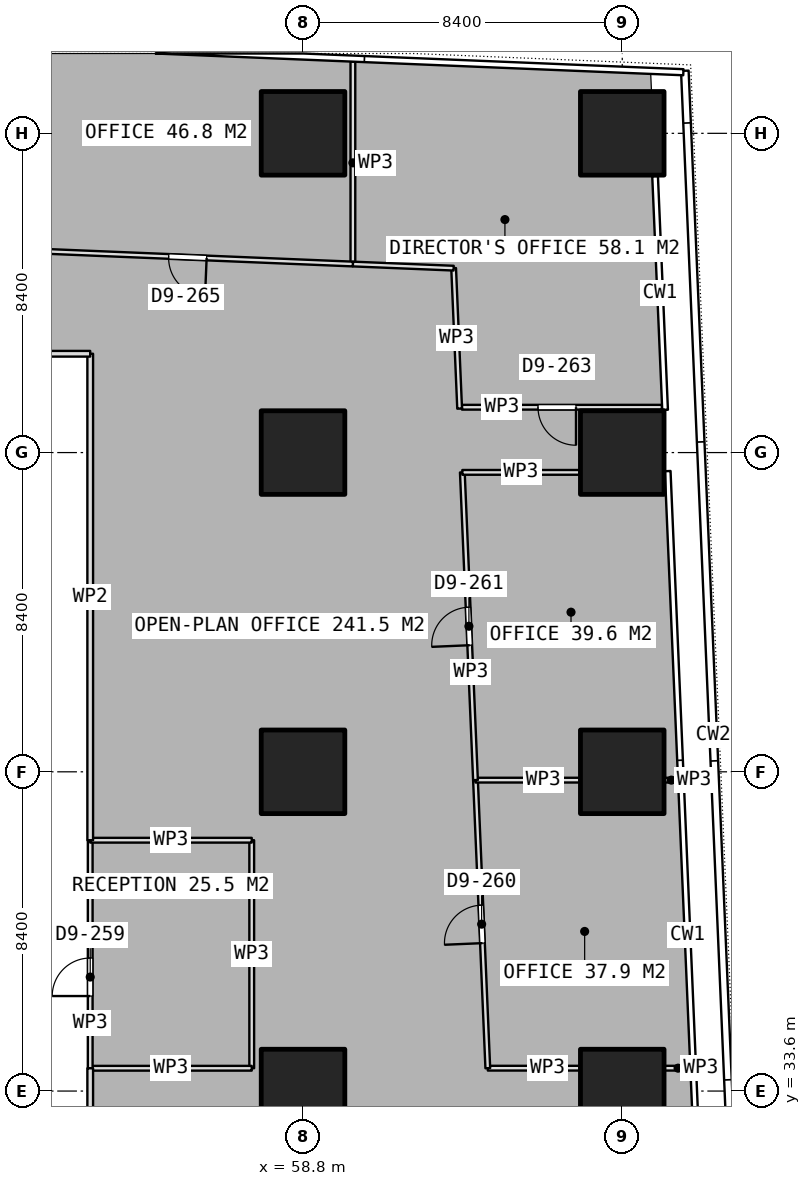
"""IFC4 building model, lengths in metres.
Left out: names, types, materials, properties, quantities, classifications, styles, units other than length and angle.
Written with IfcOpenShell. Run it as: python <this file> out.ifc"""

import sys

from ifc_helpers import new_model, si_unit, direction, frame, frame_2d, origin, origin_2d, place, context, subcontext, project, spatial, rectangle, extrude, element, fill, save


model = new_model("IFC4")
c1 = context("Model", 3, precision=1e-05, world=origin(), true_north=direction((0.0, 1.0)))
c2 = subcontext(c1, "Body", "Model", "MODEL_VIEW")
j1 = project(units=[si_unit("LENGTHUNIT", "METRE"), si_unit("PLANEANGLEUNIT", "RADIAN")], contexts=[c1])
p1 = place(None, origin())
s1 = spatial("IfcSite", under=j1, at=p1, CompositionType="ELEMENT")
p2 = place(p1, origin())
s2 = spatial("IfcBuilding", under=s1, at=p2, CompositionType="ELEMENT")
p3 = place(p2, frame((0.0, 0.0, 74.15)))
s3 = spatial("IfcBuildingStorey", under=s2, at=p3, CompositionType="ELEMENT", Elevation=74.15)
for number, where, z_axis, x_axis in (
    (1, (58.8, 33.6, 0.0), (0.0, 0.0, 1.0), (1.0, 0.0, 0.0)),
    (2, (58.8, 42.0, 0.0), (0.0, 0.0, 1.0), (1.0, 0.0, 0.0)),
    (3, (58.8, 50.4, 0.0), (0.0, 0.0, 1.0), (1.0, 0.0, 0.0)),
    (4, (58.8, 58.8, 0.0), (0.0, 0.0, 1.0), (1.0, 0.0, 0.0)),
    (5, (67.2, 33.6, 0.0), (0.0, 0.0, 1.0), (1.0, 0.0, 0.0)),
    (6, (67.2, 42.0, 0.0), (0.0, 0.0, 1.0), (1.0, 0.0, 0.0)),
    (7, (67.2, 50.4, 0.0), (0.0, 0.0, 1.0), (1.0, 0.0, 0.0)),
    (8, (67.2, 58.8, 0.0), (0.0, 0.0, 1.0), (1.0, 0.0, 0.0)),
):
    element("IfcColumn", number, at=place(p3, frame(where, z_axis=z_axis, x_axis=x_axis)), inside=s3, PredefinedType="COLUMN", context=c2, shape_type="SweptSolid", body=[
        extrude(rectangle(XDim=2.2, YDim=2.2, at=origin_2d()), origin(), (0.0, 0.0, 1.0), 3.75),
    ])
p4 = place(p3, frame((69.017, 34.202, 0.0), z_axis=(0.0, 0.0, 1.0), x_axis=(-1.0, 0.0, 0.0)))
e9 = element("IfcWall", 9, at=p4, inside=s3, PredefinedType="PARTITIONING", context=c2, shape_type="SweptSolid", body=[
    extrude(rectangle(XDim=0.697, YDim=0.125, at=frame_2d((0.349, 0.0))), origin(), (0.0, 0.0, 1.0), 3.5),
])
p5 = place(p3, frame((66.08, 34.202, 0.0), z_axis=(0.0, 0.0, 1.0), x_axis=(-1.0, 0.0, 0.0)))
e10 = element("IfcWall", 10, at=p5, inside=s3, PredefinedType="PARTITIONING", context=c2, shape_type="SweptSolid", body=[
    extrude(rectangle(XDim=2.418, YDim=0.125, at=frame_2d((1.209, 0.0))), origin(), (0.0, 0.0, 1.0), 3.5),
])
p6 = place(p3, frame((63.662, 34.202, 0.0), z_axis=(0.0, 0.0, 1.0), x_axis=(-0.042738905229, 0.999086275544, 0.0)))
e11 = element("IfcWall", 11, at=p6, inside=s3, PredefinedType="PARTITIONING", context=c2, shape_type="SweptSolid", body=[
    extrude(rectangle(XDim=7.586, YDim=0.125, at=frame_2d((3.793, 0.0))), origin(), (0.0, 0.0, 1.0), 3.5),
])
p7 = place(p6, frame((3.293, 0.0, 0.0)))
e12 = element("IfcOpeningElement", 12, at=p7, cuts=e11, PredefinedType="OPENING", context=c2, shape_type="SweptSolid", body=[
    extrude(rectangle(XDim=1.0, YDim=2.1, at=frame_2d((0.5, 1.05))), frame((0.0, 0.073, 0.0), z_axis=(0.0, -1.0, 0.0), x_axis=(1.0, 0.0, 0.0)), (0.0, 0.0, 1.0), 0.145),
])
p8 = place(p3, frame((63.338, 41.781, 0.0), z_axis=(0.0, 0.0, 1.0), x_axis=(1.0, 0.0, 0.0)))
e13 = element("IfcWall", 13, at=p8, inside=s3, PredefinedType="PARTITIONING", context=c2, shape_type="SweptSolid", body=[
    extrude(rectangle(XDim=2.742, YDim=0.125, at=frame_2d((1.371, 0.0))), origin(), (0.0, 0.0, 1.0), 3.5),
])
p9 = place(p3, frame((68.32, 41.781, 0.0), z_axis=(0.0, 0.0, 1.0), x_axis=(1.0, 0.0, 0.0)))
e14 = element("IfcWall", 14, at=p9, inside=s3, PredefinedType="PARTITIONING", context=c2, shape_type="SweptSolid", body=[
    extrude(rectangle(XDim=0.343, YDim=0.125, at=frame_2d((0.171, 0.0))), origin(), (0.0, 0.0, 1.0), 3.5),
])
p10 = place(p3, frame((63.338, 41.782, 0.0), z_axis=(0.0, 0.0, 1.0), x_axis=(-0.042686820675, 0.999088502256, 0.0)))
e15 = element("IfcWall", 15, at=p10, inside=s3, PredefinedType="PARTITIONING", context=c2, shape_type="SweptSolid", body=[
    extrude(rectangle(XDim=8.104, YDim=0.125, at=frame_2d((4.052, 0.0))), origin(), (0.0, 0.0, 1.0), 3.5),
])
p11 = place(p10, frame((3.552, 0.0, 0.0)))
e16 = element("IfcOpeningElement", 16, at=p11, cuts=e15, PredefinedType="OPENING", context=c2, shape_type="SweptSolid", body=[
    extrude(rectangle(XDim=1.0, YDim=2.1, at=frame_2d((0.5, 1.05))), frame((0.0, 0.073, 0.0), z_axis=(0.0, -1.0, 0.0), x_axis=(1.0, 0.0, 0.0)), (0.0, 0.0, 1.0), 0.145),
])
p12 = place(p3, frame((62.992, 49.879, 0.0), z_axis=(0.0, 0.0, 1.0), x_axis=(1.0, 0.0, 0.0)))
e17 = element("IfcWall", 17, at=p12, inside=s3, PredefinedType="PARTITIONING", context=c2, shape_type="SweptSolid", body=[
    extrude(rectangle(XDim=3.088, YDim=0.125, at=frame_2d((1.544, 0.0))), origin(), (0.0, 0.0, 1.0), 3.5),
])
p13 = place(p3, frame((60.112, 55.361, 0.0), z_axis=(0.0, 0.0, 1.0), x_axis=(0.0, 1.0, 0.0)))
e18 = element("IfcWall", 18, at=p13, inside=s3, PredefinedType="PARTITIONING", context=c2, shape_type="SweptSolid", body=[
    extrude(rectangle(XDim=5.325, YDim=0.125, at=frame_2d((2.663, 0.0))), origin(), (0.0, 0.0, 1.0), 3.5),
])
p14 = place(p3, frame((68.244, 51.593, 0.0), z_axis=(0.0, 0.0, 1.0), x_axis=(-1.0, 0.0, 0.0)))
e19 = element("IfcWall", 19, at=p14, inside=s3, PredefinedType="PARTITIONING", context=c2, shape_type="SweptSolid", body=[
    extrude(rectangle(XDim=5.262, YDim=0.125, at=frame_2d((2.631, 0.0))), origin(), (0.0, 0.0, 1.0), 3.5),
])
p15 = place(p14, frame((2.261, 0.0, 0.0)))
e20 = element("IfcOpeningElement", 20, at=p15, cuts=e19, PredefinedType="OPENING", context=c2, shape_type="SweptSolid", body=[
    extrude(rectangle(XDim=1.0, YDim=2.1, at=frame_2d((0.5, 1.05))), frame((0.0, 0.073, 0.0), z_axis=(0.0, -1.0, 0.0), x_axis=(1.0, 0.0, 0.0)), (0.0, 0.0, 1.0), 0.145),
])
p16 = place(p3, frame((62.921, 51.557, 0.0), z_axis=(0.0, 0.0, 1.0), x_axis=(-0.042709589124, 0.999087529197, 0.0)))
e21 = element("IfcWall", 21, at=p16, inside=s3, PredefinedType="PARTITIONING", context=c2, shape_type="SweptSolid", body=[
    extrude(rectangle(XDim=3.698, YDim=0.125, at=frame_2d((1.849, 0.0))), origin(), (0.0, 0.0, 1.0), 3.5),
])
p17 = place(p3, frame((62.763, 55.252, 0.0), z_axis=(0.0, 0.0, 1.0), x_axis=(-0.999153681613, 0.041132961474, 0.0)))
e22 = element("IfcWall", 22, at=p17, inside=s3, PredefinedType="PARTITIONING", context=c2, shape_type="SweptSolid", body=[
    extrude(rectangle(XDim=2.653, YDim=0.125, at=frame_2d((1.327, 0.0))), origin(), (0.0, 0.0, 1.0), 3.5),
])
p18 = place(p3, frame((60.111, 55.361, 0.0), z_axis=(0.0, 0.0, 1.0), x_axis=(-0.99914928457, 0.041239630726, 0.0)))
e23 = element("IfcWall", 23, at=p18, inside=s3, PredefinedType="PARTITIONING", context=c2, shape_type="SweptSolid", body=[
    extrude(rectangle(XDim=8.702, YDim=0.125, at=frame_2d((4.351, 0.0))), origin(), (0.0, 0.0, 1.0), 3.5),
])
p19 = place(p18, frame((3.851, 0.0, 0.0)))
e24 = element("IfcOpeningElement", 24, at=p19, cuts=e23, PredefinedType="OPENING", context=c2, shape_type="SweptSolid", body=[
    extrude(rectangle(XDim=1.0, YDim=2.1, at=frame_2d((0.5, 1.05))), frame((0.0, 0.073, 0.0), z_axis=(0.0, -1.0, 0.0), x_axis=(1.0, 0.0, 0.0)), (0.0, 0.0, 1.0), 0.145),
])
p20 = place(p3, frame((57.45, 40.2, 0.0), z_axis=(0.0, 0.0, 1.0), x_axis=(0.0, -1.0, 0.0)))
e25 = element("IfcWall", 25, at=p20, inside=s3, PredefinedType="PARTITIONING", context=c2, shape_type="SweptSolid", body=[
    extrude(rectangle(XDim=6.0, YDim=0.125, at=frame_2d((3.0, 0.0))), origin(), (0.0, 0.0, 1.0), 3.5),
])
p21 = place(p3, frame((57.45, 34.2, 0.0), z_axis=(0.0, 0.0, 1.0), x_axis=(-1.0, 0.0, 0.0)))
e26 = element("IfcWall", 26, at=p21, inside=s3, PredefinedType="PARTITIONING", context=c2, shape_type="SweptSolid", body=[
    extrude(rectangle(XDim=4.25, YDim=0.125, at=frame_2d((2.125, 0.0))), origin(), (0.0, 0.0, 1.0), 3.5),
])
p22 = place(p3, frame((53.2, 34.2, 0.0), z_axis=(0.0, 0.0, 1.0), x_axis=(0.0, 1.0, 0.0)))
e27 = element("IfcWall", 27, at=p22, inside=s3, PredefinedType="PARTITIONING", context=c2, shape_type="SweptSolid", body=[
    extrude(rectangle(XDim=6.0, YDim=0.125, at=frame_2d((3.0, 0.0))), origin(), (0.0, 0.0, 1.0), 3.5),
])
p23 = place(p22, frame((1.9, 0.0, 0.0)))
e28 = element("IfcOpeningElement", 28, at=p23, cuts=e27, PredefinedType="OPENING", context=c2, shape_type="SweptSolid", body=[
    extrude(rectangle(XDim=1.0, YDim=2.1, at=frame_2d((0.5, 1.05))), frame((0.0, 0.073, 0.0), z_axis=(0.0, -1.0, 0.0), x_axis=(1.0, 0.0, 0.0)), (0.0, 0.0, 1.0), 0.145),
])
p24 = place(p3, frame((53.2, 40.2, 0.0), z_axis=(0.0, 0.0, 1.0), x_axis=(1.0, 0.0, 0.0)))
e29 = element("IfcWall", 29, at=p24, inside=s3, PredefinedType="PARTITIONING", context=c2, shape_type="SweptSolid", body=[
    extrude(rectangle(XDim=4.25, YDim=0.125, at=frame_2d((2.125, 0.0))), origin(), (0.0, 0.0, 1.0), 3.5),
])
p25 = place(p3, frame((53.2, 31.2, 0.0), z_axis=(0.0, 0.0, 1.0), x_axis=(0.0, 1.0, 0.0)))
e30 = element("IfcWall", 30, at=p25, inside=s3, PredefinedType="PARTITIONING", context=c2, shape_type="SweptSolid", body=[
    extrude(rectangle(XDim=3.0, YDim=0.15, at=frame_2d((1.5, 0.0))), origin(), (0.0, 0.0, 1.0), 3.5),
])
p26 = place(p3, frame((53.2, 40.2, 0.0), z_axis=(0.0, 0.0, 1.0), x_axis=(0.0, 1.0, 0.0)))
e31 = element("IfcWall", 31, at=p26, inside=s3, PredefinedType="PARTITIONING", context=c2, shape_type="SweptSolid", body=[
    extrude(rectangle(XDim=12.8, YDim=0.15, at=frame_2d((6.4, 0.0))), origin(), (0.0, 0.0, 1.0), 3.5),
])
p27 = place(p3, frame((53.2, 53.0, 0.0), z_axis=(0.0, 0.0, 1.0), x_axis=(-1.0, 0.0, 0.0)))
e32 = element("IfcWall", 32, at=p27, inside=s3, PredefinedType="PARTITIONING", context=c2, shape_type="SweptSolid", body=[
    extrude(rectangle(XDim=1.784, YDim=0.15, at=frame_2d((0.892, 0.0))), origin(), (0.0, 0.0, 1.0), 3.5),
])
p28 = place(p7, origin())
e33 = element("IfcDoor", 33, at=p28, inside=s3, OperationType="SINGLE_SWING_LEFT", PredefinedType="DOOR", context=c2, shape_type="SweptSolid", body=[
    extrude(rectangle(XDim=1.0, YDim=2.1, at=frame_2d((0.5, 1.05))), frame((0.0, 0.025, 0.0), z_axis=(0.0, -1.0, 0.0), x_axis=(1.0, 0.0, 0.0)), (0.0, 0.0, 1.0), 0.05),
])
fill(e12, e33)
p29 = place(p11, origin())
e34 = element("IfcDoor", 34, at=p29, inside=s3, OperationType="SINGLE_SWING_LEFT", PredefinedType="DOOR", context=c2, shape_type="SweptSolid", body=[
    extrude(rectangle(XDim=1.0, YDim=2.1, at=frame_2d((0.5, 1.05))), frame((0.0, 0.025, 0.0), z_axis=(0.0, -1.0, 0.0), x_axis=(1.0, 0.0, 0.0)), (0.0, 0.0, 1.0), 0.05),
])
fill(e16, e34)
p30 = place(p15, origin())
e35 = element("IfcDoor", 35, at=p30, inside=s3, OperationType="SINGLE_SWING_LEFT", PredefinedType="DOOR", context=c2, shape_type="SweptSolid", body=[
    extrude(rectangle(XDim=1.0, YDim=2.1, at=frame_2d((0.5, 1.05))), frame((0.0, 0.025, 0.0), z_axis=(0.0, -1.0, 0.0), x_axis=(1.0, 0.0, 0.0)), (0.0, 0.0, 1.0), 0.05),
])
fill(e20, e35)
p31 = place(p19, origin())
e36 = element("IfcDoor", 36, at=p31, inside=s3, OperationType="SINGLE_SWING_LEFT", PredefinedType="DOOR", context=c2, shape_type="SweptSolid", body=[
    extrude(rectangle(XDim=1.0, YDim=2.1, at=frame_2d((0.5, 1.05))), frame((0.0, 0.025, 0.0), z_axis=(0.0, -1.0, 0.0), x_axis=(1.0, 0.0, 0.0)), (0.0, 0.0, 1.0), 0.05),
])
fill(e24, e36)
p32 = place(p23, origin())
e37 = element("IfcDoor", 37, at=p32, inside=s3, OperationType="SINGLE_SWING_LEFT", PredefinedType="DOOR", context=c2, shape_type="SweptSolid", body=[
    extrude(rectangle(XDim=1.0, YDim=2.1, at=frame_2d((0.5, 1.05))), frame((0.0, 0.025, 0.0), z_axis=(0.0, -1.0, 0.0), x_axis=(1.0, 0.0, 0.0)), (0.0, 0.0, 1.0), 0.05),
])
fill(e28, e37)
save(model, sys.argv[1])
